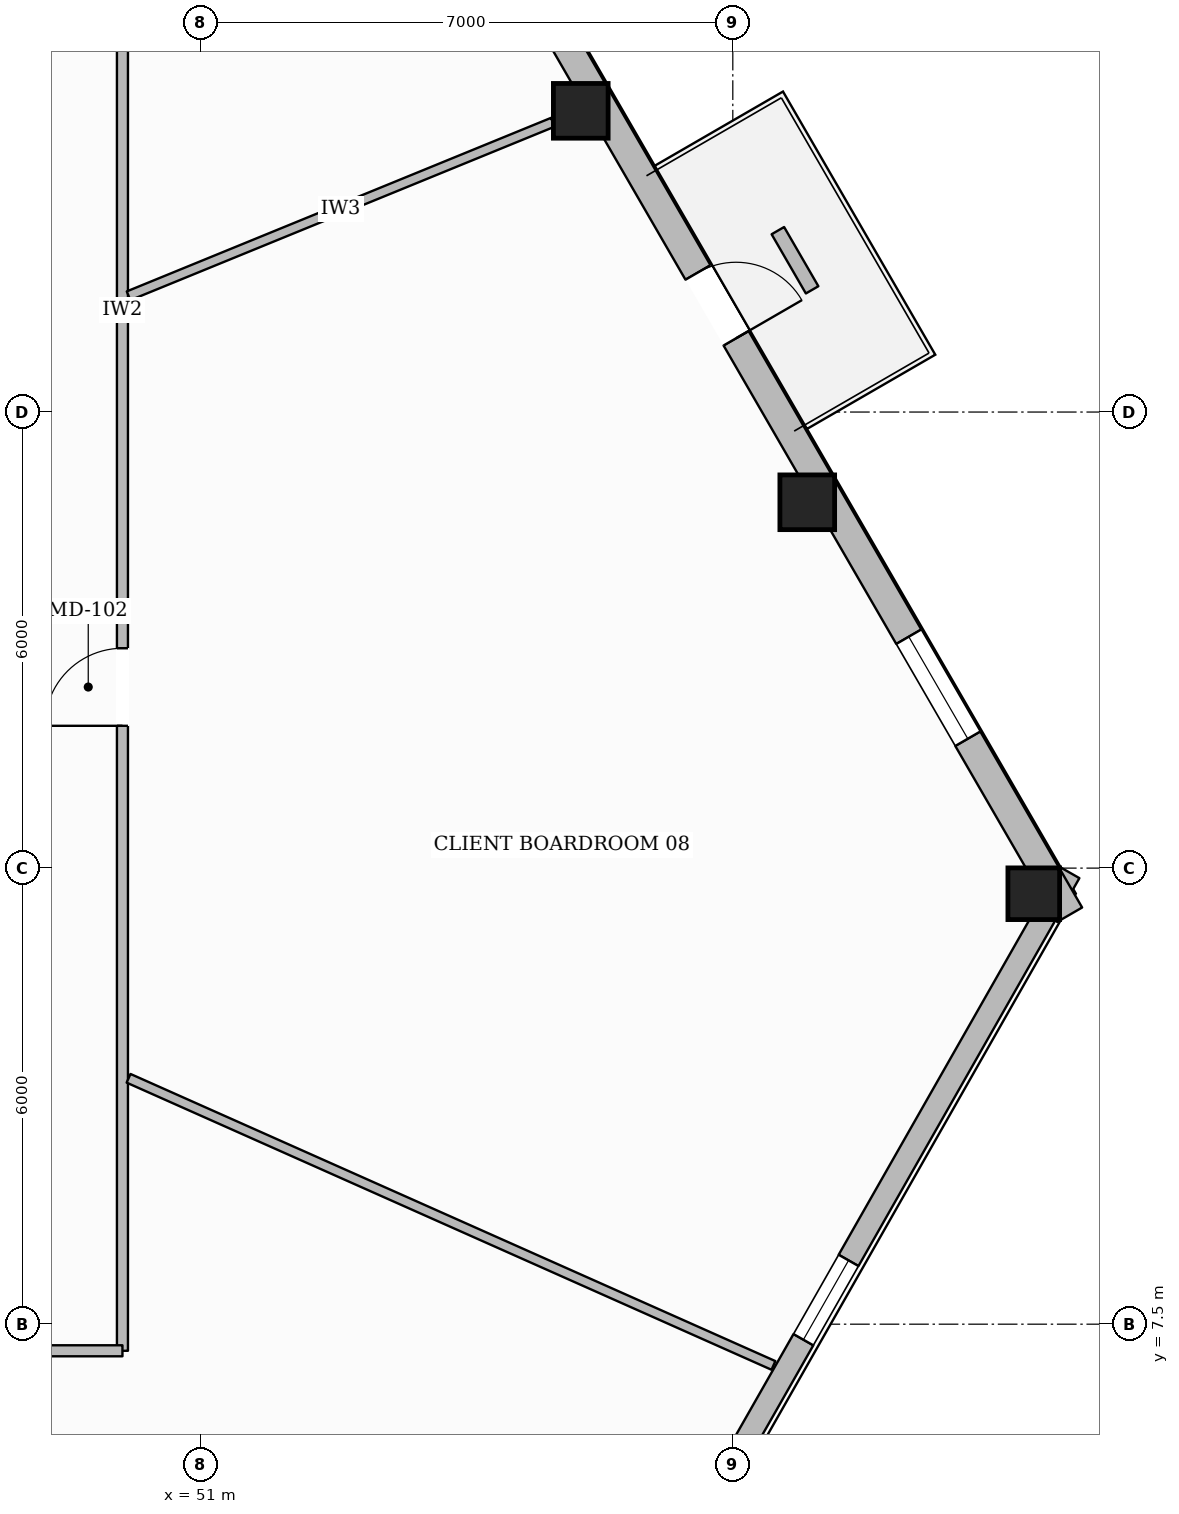
"""IFC4 building model, lengths in metres.
Left out: names, types, materials, properties, quantities, classifications, styles, units other than length and angle.
Written with IfcOpenShell. Run it as: python <this file> out.ifc"""

import sys

from ifc_helpers import new_model, si_unit, direction, frame, frame_2d, origin, origin_2d, place, context, subcontext, project, spatial, rectangle, hollow_rectangle, extrude, element, fill, save


model = new_model("IFC4")
c1 = context("Model", 3, precision=1e-05, world=origin(), true_north=direction((0.0, 1.0)))
c2 = subcontext(c1, "Body", "Model", "MODEL_VIEW")
j1 = project(units=[si_unit("LENGTHUNIT", "METRE"), si_unit("PLANEANGLEUNIT", "RADIAN")], contexts=[c1])
p1 = place(None, origin())
s1 = spatial("IfcSite", under=j1, at=p1, CompositionType="ELEMENT")
p2 = place(p1, origin())
s2 = spatial("IfcBuilding", under=s1, at=p2, CompositionType="ELEMENT")
p3 = place(p2, frame((0.0, 0.0, 112.45)))
s3 = spatial("IfcBuildingStorey", under=s2, at=p3, CompositionType="ELEMENT", Elevation=112.45)
p4 = place(p3, frame((61.959, 13.163, 0.0), z_axis=(0.0, 0.0, 1.0), x_axis=(1.0, 0.0, 0.0)))
e1 = element("IfcColumn", 1, at=p4, inside=s3, PredefinedType="COLUMN", context=c2, shape_type="SweptSolid", body=[
    extrude(hollow_rectangle(XDim=0.68, YDim=0.68, WallThickness=0.03, at=origin_2d()), origin(), (0.0, 0.0, 1.0), 3.6),
])
for number, where, z_axis, x_axis in (
    (2, (58.979, 18.313, 0.0), (0.0, 0.0, 1.0), (1.0, 0.0, 0.0)),
    (3, (56.0, 23.463, 0.0), (0.0, 0.0, 1.0), (1.0, 0.0, 0.0)),
):
    element("IfcColumn", number, at=place(p3, frame(where, z_axis=z_axis, x_axis=x_axis)), inside=s3, PredefinedType="COLUMN", context=c2, shape_type="SweptSolid", body=[
        extrude(hollow_rectangle(XDim=0.72, YDim=0.72, WallThickness=0.032, at=origin_2d()), origin(), (0.0, 0.0, 1.0), 3.6),
    ])
p5 = place(p3, frame((62.429, 13.442, 0.0), z_axis=(0.0, 0.0, 1.0), x_axis=(-0.49490368697, -0.868947835387, 0.0)))
e4 = element("IfcWall", 4, at=p5, inside=s3, PredefinedType="STANDARD", context=c2, shape_type="SweptSolid", body=[
    extrude(rectangle(XDim=12.946, YDim=0.3, at=frame_2d((6.473, 0.0))), origin(), (0.0, 0.0, 1.0), 3.059),
])
p6 = place(p5, frame((5.873, 0.0, 0.65)))
e5 = element("IfcOpeningElement", 5, at=p6, cuts=e4, PredefinedType="OPENING", context=c2, shape_type="SweptSolid", body=[
    extrude(rectangle(XDim=1.2, YDim=1.7, at=frame_2d((0.6, 0.85))), frame((0.0, 0.16, 0.0), z_axis=(0.0, -1.0, 0.0), x_axis=(1.0, 0.0, 0.0)), (0.0, 0.0, 1.0), 0.32),
])
p7 = place(p3, frame((44.076, 44.609, 0.0), z_axis=(0.0, 0.0, 1.0), x_axis=(0.500826973377, -0.865547423737, 0.0)))
e6 = element("IfcWall", 6, at=p7, inside=s3, PredefinedType="STANDARD", context=c2, shape_type="SweptSolid", body=[
    extrude(rectangle(XDim=36.65, YDim=0.38, at=frame_2d((18.325, 0.0))), origin(), (0.0, 0.0, 1.0), 3.059),
])
p8 = place(p7, frame((26.887, 0.0, 0.0)))
e7 = element("IfcOpeningElement", 7, at=p8, cuts=e6, PredefinedType="OPENING", context=c2, shape_type="SweptSolid", body=[
    extrude(rectangle(XDim=1.0, YDim=2.2, at=frame_2d((0.5, 1.1))), frame((0.0, 0.2, 0.0), z_axis=(0.0, -1.0, 0.0), x_axis=(1.0, 0.0, 0.0)), (0.0, 0.0, 1.0), 0.4),
])
p9 = place(p7, frame((32.424, 0.0, 0.65)))
e8 = element("IfcOpeningElement", 8, at=p9, cuts=e6, PredefinedType="OPENING", context=c2, shape_type="SweptSolid", body=[
    extrude(rectangle(XDim=1.55, YDim=1.75, at=frame_2d((0.775, 0.875))), frame((0.0, 0.2, 0.0), z_axis=(0.0, -1.0, 0.0), x_axis=(1.0, 0.0, 0.0)), (0.0, 0.0, 1.0), 0.4),
])
p10 = place(p7, frame((20.524, 0.0, 0.65)))
e9 = element("IfcOpeningElement", 9, at=p10, cuts=e6, PredefinedType="OPENING", context=c2, shape_type="SweptSolid", body=[
    extrude(rectangle(XDim=1.55, YDim=1.75, at=frame_2d((0.775, 0.875))), frame((0.0, 0.2, 0.0), z_axis=(0.0, -1.0, 0.0), x_axis=(1.0, 0.0, 0.0)), (0.0, 0.0, 1.0), 0.4),
])
p11 = place(p7, frame((8.625, 0.0, 0.65)))
e10 = element("IfcOpeningElement", 10, at=p11, cuts=e6, PredefinedType="OPENING", context=c2, shape_type="SweptSolid", body=[
    extrude(rectangle(XDim=1.55, YDim=1.75, at=frame_2d((0.775, 0.875))), frame((0.0, 0.2, 0.0), z_axis=(0.0, -1.0, 0.0), x_axis=(1.0, 0.0, 0.0)), (0.0, 0.0, 1.0), 0.4),
])
p12 = place(p7, frame((2.675, 0.0, 0.65)))
e11 = element("IfcOpeningElement", 11, at=p12, cuts=e6, PredefinedType="OPENING", context=c2, shape_type="SweptSolid", body=[
    extrude(rectangle(XDim=1.55, YDim=1.75, at=frame_2d((0.775, 0.875))), frame((0.0, 0.2, 0.0), z_axis=(0.0, -1.0, 0.0), x_axis=(1.0, 0.0, 0.0)), (0.0, 0.0, 1.0), 0.4),
])
p13 = place(p3, frame((59.043, 21.108, 0.0), z_axis=(0.0, 0.0, 1.0), x_axis=(-0.500747535571, 0.865593383535, 0.0)))
e12 = element("IfcWall", 12, at=p13, inside=s3, PredefinedType="USERDEFINED", context=c2, shape_type="SweptSolid", body=[
    extrude(rectangle(XDim=0.9, YDim=0.19, at=frame_2d((0.45, 0.0))), origin(), (0.0, 0.0, 1.0), 0.5),
])
p14 = place(p3, frame((49.97, 7.15, 0.0), z_axis=(0.0, 0.0, 1.0), x_axis=(0.0, 1.0, 0.0)))
e13 = element("IfcWall", 13, at=p14, inside=s3, PredefinedType="PARTITIONING", context=c2, shape_type="SweptSolid", body=[
    extrude(rectangle(XDim=17.9, YDim=0.145, at=frame_2d((8.95, 0.0))), origin(), (0.0, 0.0, 1.0), 3.288),
])
p15 = place(p14, frame((8.222, 0.0, 0.0)))
e14 = element("IfcOpeningElement", 14, at=p15, cuts=e13, PredefinedType="OPENING", context=c2, shape_type="SweptSolid", body=[
    extrude(rectangle(XDim=1.02, YDim=2.15, at=frame_2d((0.51, 1.075))), frame((0.0, 0.083, 0.0), z_axis=(0.0, -1.0, 0.0), x_axis=(1.0, 0.0, 0.0)), (0.0, 0.0, 1.0), 0.165),
])
p16 = place(p3, frame((26.03, 7.15, 0.0), z_axis=(0.0, 0.0, 1.0), x_axis=(1.0, 0.0, 0.0)))
e15 = element("IfcWall", 15, at=p16, inside=s3, PredefinedType="PARTITIONING", context=c2, shape_type="SweptSolid", body=[
    extrude(rectangle(XDim=23.94, YDim=0.145, at=frame_2d((11.97, 0.0))), origin(), (0.0, 0.0, 1.0), 3.6),
])
p17 = place(p16, frame((7.494, 0.0, 0.0)))
e16 = element("IfcOpeningElement", 16, at=p17, cuts=e15, PredefinedType="OPENING", context=c2, shape_type="SweptSolid", body=[
    extrude(rectangle(XDim=1.4, YDim=2.2, at=frame_2d((0.7, 1.1))), frame((0.0, 0.083, 0.0), z_axis=(0.0, -1.0, 0.0), x_axis=(1.0, 0.0, 0.0)), (0.0, 0.0, 1.0), 0.165),
])
p18 = place(p16, frame((19.496, 0.0, 0.0)))
e17 = element("IfcOpeningElement", 17, at=p18, cuts=e15, PredefinedType="OPENING", context=c2, shape_type="SweptSolid", body=[
    extrude(rectangle(XDim=1.4, YDim=2.2, at=frame_2d((0.7, 1.1))), frame((0.0, 0.083, 0.0), z_axis=(0.0, -1.0, 0.0), x_axis=(1.0, 0.0, 0.0)), (0.0, 0.0, 1.0), 0.165),
])
p19 = place(p3, frame((50.051, 21.029, 0.0), z_axis=(0.0, 0.0, 1.0), x_axis=(0.925558564756, 0.378604468024, 0.0)))
e18 = element("IfcWall", 18, at=p19, inside=s3, PredefinedType="PARTITIONING", context=c2, shape_type="SweptSolid", body=[
    extrude(rectangle(XDim=6.03, YDim=0.125, at=frame_2d((3.015, 0.0))), origin(), (0.0, 0.0, 1.0), 3.141),
])
p20 = place(p3, frame((50.051, 10.735, 0.0), z_axis=(0.0, 0.0, 1.0), x_axis=(0.913546845119, -0.406733526738, 0.0)))
e19 = element("IfcWall", 19, at=p20, inside=s3, PredefinedType="PARTITIONING", context=c2, shape_type="SweptSolid", body=[
    extrude(rectangle(XDim=9.287, YDim=0.125, at=frame_2d((4.644, 0.0))), origin(), (0.0, 0.0, 1.0), 3.6),
])
p21 = place(p8, origin())
e20 = element("IfcDoor", 20, at=p21, inside=s3, OperationType="SINGLE_SWING_RIGHT", PredefinedType="DOOR", context=c2, shape_type="SweptSolid", body=[
    extrude(rectangle(XDim=1.0, YDim=2.2, at=frame_2d((0.5, 1.1))), frame((0.0, 0.025, 0.0), z_axis=(0.0, -1.0, 0.0), x_axis=(1.0, 0.0, 0.0)), (0.0, 0.0, 1.0), 0.05),
])
fill(e7, e20)
p22 = place(p9, origin())
e21 = element("IfcWindow", 21, at=p22, inside=s3, PartitioningType="SINGLE_PANEL", PredefinedType="WINDOW", context=c2, shape_type="SweptSolid", body=[
    extrude(rectangle(XDim=1.55, YDim=1.75, at=frame_2d((0.775, 0.875))), frame((0.0, 0.03, 0.0), z_axis=(0.0, -1.0, 0.0), x_axis=(1.0, 0.0, 0.0)), (0.0, 0.0, 1.0), 0.06),
])
fill(e8, e21)
p23 = place(p6, origin())
e22 = element("IfcWindow", 22, at=p23, inside=s3, PartitioningType="SINGLE_PANEL", PredefinedType="WINDOW", context=c2, shape_type="SweptSolid", body=[
    extrude(rectangle(XDim=1.2, YDim=1.7, at=frame_2d((0.6, 0.85))), frame((0.0, 0.03, 0.0), z_axis=(0.0, -1.0, 0.0), x_axis=(1.0, 0.0, 0.0)), (0.0, 0.0, 1.0), 0.06),
])
fill(e5, e22)
p24 = place(p15, origin())
e23 = element("IfcDoor", 23, at=p24, inside=s3, OperationType="SINGLE_SWING_LEFT", PredefinedType="DOOR", context=c2, shape_type="SweptSolid", body=[
    extrude(rectangle(XDim=1.02, YDim=2.15, at=frame_2d((0.51, 1.075))), frame((0.0, 0.025, 0.0), z_axis=(0.0, -1.0, 0.0), x_axis=(1.0, 0.0, 0.0)), (0.0, 0.0, 1.0), 0.05),
])
fill(e14, e23)
save(model, sys.argv[1])
